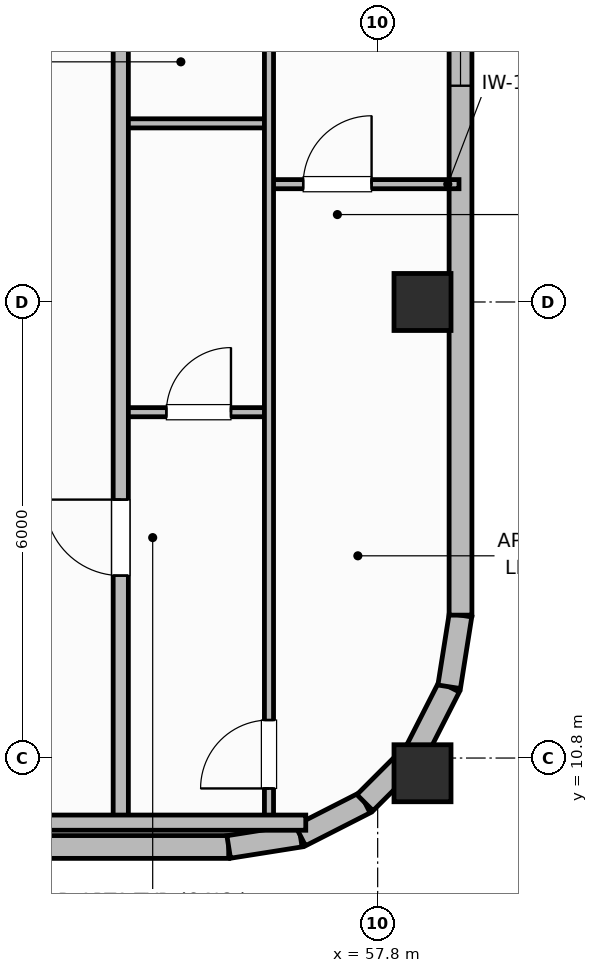
"""IFC4 building model, lengths in metres.
Left out: names, types, materials, properties, quantities, classifications, styles, units other than length and angle.
Written with IfcOpenShell. Run it as: python <this file> out.ifc"""

import sys

from ifc_helpers import new_model, si_unit, direction, frame, frame_2d, origin, origin_2d, place, context, subcontext, project, spatial, rectangle, extrude, element, fill, save


model = new_model("IFC4")
c1 = context("Model", 3, precision=1e-05, world=origin(), true_north=direction((0.0, 1.0)))
c2 = subcontext(c1, "Body", "Model", "MODEL_VIEW")
j1 = project(units=[si_unit("LENGTHUNIT", "METRE"), si_unit("PLANEANGLEUNIT", "RADIAN")], contexts=[c1])
p1 = place(None, origin())
s1 = spatial("IfcSite", under=j1, at=p1, CompositionType="ELEMENT")
p2 = place(p1, origin())
s2 = spatial("IfcBuilding", under=s1, at=p2, CompositionType="ELEMENT")
p3 = place(p2, frame((0.0, 0.0, 271.3)))
s3 = spatial("IfcBuildingStorey", under=s2, at=p3, CompositionType="ELEMENT", Elevation=271.3)
for number, where, z_axis, x_axis in (
    (1, (58.39, 10.6, 0.0), (0.0, 0.0, 1.0), (1.0, 0.0, 0.0)),
    (2, (58.39, 16.8, 0.0), (0.0, 0.0, 1.0), (1.0, 0.0, 0.0)),
):
    element("IfcColumn", number, at=place(p3, frame(where, z_axis=z_axis, x_axis=x_axis)), inside=s3, PredefinedType="COLUMN", context=c2, shape_type="SweptSolid", body=[
        extrude(rectangle(XDim=0.75, YDim=0.75, at=origin_2d()), origin(), (0.0, 0.0, 1.0), 3.7),
    ])
p4 = place(p3, frame((22.56, 9.63, 0.0), z_axis=(0.0, 0.0, 1.0), x_axis=(1.0, 0.0, 0.0)))
e3 = element("IfcWall", 3, at=p4, inside=s3, PredefinedType="SOLIDWALL", context=c2, shape_type="SweptSolid", body=[
    extrude(rectangle(XDim=33.28, YDim=0.3, at=frame_2d((16.64, 0.0))), origin(), (0.0, 0.0, 1.0), 2.73),
])
p5 = place(p4, frame((4.448, 0.0, 0.95)))
e4 = element("IfcOpeningElement", 4, at=p5, cuts=e3, PredefinedType="OPENING", context=c2, shape_type="SweptSolid", body=[
    extrude(rectangle(XDim=1.1, YDim=1.65, at=frame_2d((0.55, 0.825))), frame((0.0, 0.16, 0.0), z_axis=(0.0, -1.0, 0.0), x_axis=(1.0, 0.0, 0.0)), (0.0, 0.0, 1.0), 0.32),
])
p6 = place(p4, frame((6.762, 0.0, 0.95)))
e5 = element("IfcOpeningElement", 5, at=p6, cuts=e3, PredefinedType="OPENING", context=c2, shape_type="SweptSolid", body=[
    extrude(rectangle(XDim=1.1, YDim=1.65, at=frame_2d((0.55, 0.825))), frame((0.0, 0.16, 0.0), z_axis=(0.0, -1.0, 0.0), x_axis=(1.0, 0.0, 0.0)), (0.0, 0.0, 1.0), 0.32),
])
p7 = place(p4, frame((9.427, 0.0, 0.95)))
e6 = element("IfcOpeningElement", 6, at=p7, cuts=e3, PredefinedType="OPENING", context=c2, shape_type="SweptSolid", body=[
    extrude(rectangle(XDim=1.1, YDim=1.65, at=frame_2d((0.55, 0.825))), frame((0.0, 0.16, 0.0), z_axis=(0.0, -1.0, 0.0), x_axis=(1.0, 0.0, 0.0)), (0.0, 0.0, 1.0), 0.32),
])
p8 = place(p4, frame((14.758, 0.0, 0.95)))
e7 = element("IfcOpeningElement", 7, at=p8, cuts=e3, PredefinedType="OPENING", context=c2, shape_type="SweptSolid", body=[
    extrude(rectangle(XDim=1.1, YDim=1.65, at=frame_2d((0.55, 0.825))), frame((0.0, 0.16, 0.0), z_axis=(0.0, -1.0, 0.0), x_axis=(1.0, 0.0, 0.0)), (0.0, 0.0, 1.0), 0.32),
])
p9 = place(p4, frame((17.423, 0.0, 0.95)))
e8 = element("IfcOpeningElement", 8, at=p9, cuts=e3, PredefinedType="OPENING", context=c2, shape_type="SweptSolid", body=[
    extrude(rectangle(XDim=1.1, YDim=1.65, at=frame_2d((0.55, 0.825))), frame((0.0, 0.16, 0.0), z_axis=(0.0, -1.0, 0.0), x_axis=(1.0, 0.0, 0.0)), (0.0, 0.0, 1.0), 0.32),
])
p10 = place(p4, frame((22.752, 0.0, 0.95)))
e9 = element("IfcOpeningElement", 9, at=p10, cuts=e3, PredefinedType="OPENING", context=c2, shape_type="SweptSolid", body=[
    extrude(rectangle(XDim=1.1, YDim=1.65, at=frame_2d((0.55, 0.825))), frame((0.0, 0.16, 0.0), z_axis=(0.0, -1.0, 0.0), x_axis=(1.0, 0.0, 0.0)), (0.0, 0.0, 1.0), 0.32),
])
p11 = place(p4, frame((25.417, 0.0, 0.95)))
e10 = element("IfcOpeningElement", 10, at=p11, cuts=e3, PredefinedType="OPENING", context=c2, shape_type="SweptSolid", body=[
    extrude(rectangle(XDim=1.1, YDim=1.65, at=frame_2d((0.55, 0.825))), frame((0.0, 0.16, 0.0), z_axis=(0.0, -1.0, 0.0), x_axis=(1.0, 0.0, 0.0)), (0.0, 0.0, 1.0), 0.32),
])
p12 = place(p4, frame((27.732, 0.0, 0.95)))
e11 = element("IfcOpeningElement", 11, at=p12, cuts=e3, PredefinedType="OPENING", context=c2, shape_type="SweptSolid", body=[
    extrude(rectangle(XDim=1.1, YDim=1.65, at=frame_2d((0.55, 0.825))), frame((0.0, 0.16, 0.0), z_axis=(0.0, -1.0, 0.0), x_axis=(1.0, 0.0, 0.0)), (0.0, 0.0, 1.0), 0.32),
])
p13 = place(p3, frame((55.84, 9.63, 0.0), z_axis=(0.0, 0.0, 1.0), x_axis=(0.987663181641, 0.156593229835, 0.0)))
e12 = element("IfcWall", 12, at=p13, inside=s3, PredefinedType="SOLIDWALL", context=c2, shape_type="SweptSolid", body=[
    extrude(rectangle(XDim=0.954, YDim=0.3, at=frame_2d((0.477, 0.0))), origin(), (0.0, 0.0, 1.0), 2.73),
])
for number, where, z_axis, x_axis in (
    (13, (56.782, 9.779, 0.0), (0.0, 0.0, 1.0), (0.891, 0.454, 0.0)),
    (14, (57.633, 10.212, 0.0), (0.0, 0.0, 1.0), (0.707, 0.707, 0.0)),
    (15, (58.308, 10.887, 0.0), (0.0, 0.0, 1.0), (0.454, 0.891, 0.0)),
):
    element("IfcWall", number, at=place(p3, frame(where, z_axis=z_axis, x_axis=x_axis)), inside=s3, PredefinedType="SOLIDWALL", context=c2, shape_type="SweptSolid", body=[
        extrude(rectangle(XDim=0.954, YDim=0.3, at=frame_2d((0.477, 0.0))), origin(), (0.0, 0.0, 1.0), 2.73),
    ])
p14 = place(p3, frame((58.741, 11.738, 0.0), z_axis=(0.0, 0.0, 1.0), x_axis=(0.156343617883, 0.987702725088, 0.0)))
e16 = element("IfcWall", 16, at=p14, inside=s3, PredefinedType="SOLIDWALL", context=c2, shape_type="SweptSolid", body=[
    extrude(rectangle(XDim=0.954, YDim=0.3, at=frame_2d((0.477, 0.0))), origin(), (0.0, 0.0, 1.0), 2.73),
])
p15 = place(p3, frame((58.89, 12.68, 0.0), z_axis=(0.0, 0.0, 1.0), x_axis=(0.0, 1.0, 0.0)))
e17 = element("IfcWall", 17, at=p15, inside=s3, PredefinedType="SOLIDWALL", context=c2, shape_type="SweptSolid", body=[
    extrude(rectangle(XDim=11.12, YDim=0.3, at=frame_2d((5.56, 0.0))), origin(), (0.0, 0.0, 1.0), 2.73),
])
p16 = place(p15, frame((6.965, 0.0, 0.71)))
e18 = element("IfcOpeningElement", 18, at=p16, cuts=e17, PredefinedType="OPENING", context=c2, shape_type="SweptSolid", body=[
    extrude(rectangle(XDim=2.1, YDim=1.9, at=frame_2d((1.05, 0.95))), frame((0.0, 0.16, 0.0), z_axis=(0.0, -1.0, 0.0), x_axis=(1.0, 0.0, 0.0)), (0.0, 0.0, 1.0), 0.32),
])
p17 = place(p3, frame((54.42, 15.35, 0.0), z_axis=(0.0, 0.0, 1.0), x_axis=(1.0, 0.0, 0.0)))
e19 = element("IfcWall", 19, at=p17, inside=s3, PredefinedType="PARTITIONING", context=c2, shape_type="SweptSolid", body=[
    extrude(rectangle(XDim=1.95, YDim=0.12, at=frame_2d((0.975, 0.0))), origin(), (0.0, 0.0, 1.0), 2.56),
])
p18 = place(p17, frame((0.6, 0.0, 0.0)))
e20 = element("IfcOpeningElement", 20, at=p18, cuts=e19, PredefinedType="OPENING", context=c2, shape_type="SweptSolid", body=[
    extrude(rectangle(XDim=0.85, YDim=2.1, at=frame_2d((0.425, 1.05))), frame((0.0, 0.07, 0.0), z_axis=(0.0, -1.0, 0.0), x_axis=(1.0, 0.0, 0.0)), (0.0, 0.0, 1.0), 0.14),
])
p19 = place(p3, frame((54.42, 19.15, 0.0), z_axis=(0.0, 0.0, 1.0), x_axis=(1.0, 0.0, 0.0)))
e21 = element("IfcWall", 21, at=p19, inside=s3, PredefinedType="PARTITIONING", context=c2, shape_type="SweptSolid", body=[
    extrude(rectangle(XDim=1.95, YDim=0.12, at=frame_2d((0.975, 0.0))), origin(), (0.0, 0.0, 1.0), 2.56),
])
p20 = place(p3, frame((56.37, 18.35, 0.0), z_axis=(0.0, 0.0, 1.0), x_axis=(1.0, 0.0, 0.0)))
e22 = element("IfcWall", 22, at=p20, inside=s3, PredefinedType="PARTITIONING", context=c2, shape_type="SweptSolid", body=[
    extrude(rectangle(XDim=2.5, YDim=0.12, at=frame_2d((1.25, 0.0))), origin(), (0.0, 0.0, 1.0), 2.56),
])
p21 = place(p20, frame((0.45, 0.0, 0.0)))
e23 = element("IfcOpeningElement", 23, at=p21, cuts=e22, PredefinedType="OPENING", context=c2, shape_type="SweptSolid", body=[
    extrude(rectangle(XDim=0.9, YDim=2.1, at=frame_2d((0.45, 1.05))), frame((0.0, 0.07, 0.0), z_axis=(0.0, -1.0, 0.0), x_axis=(1.0, 0.0, 0.0)), (0.0, 0.0, 1.0), 0.14),
])
p22 = place(p3, frame((56.37, 9.99, 0.0), z_axis=(0.0, 0.0, 1.0), x_axis=(0.0, 1.0, 0.0)))
e24 = element("IfcWall", 24, at=p22, inside=s3, PredefinedType="PARTITIONING", context=c2, shape_type="SweptSolid", body=[
    extrude(rectangle(XDim=13.62, YDim=0.12, at=frame_2d((6.81, 0.0))), origin(), (0.0, 0.0, 1.0), 2.56),
])
p23 = place(p22, frame((0.41, 0.0, 0.0)))
e25 = element("IfcOpeningElement", 25, at=p23, cuts=e24, PredefinedType="OPENING", context=c2, shape_type="SweptSolid", body=[
    extrude(rectangle(XDim=0.9, YDim=2.1, at=frame_2d((0.45, 1.05))), frame((0.0, 0.07, 0.0), z_axis=(0.0, -1.0, 0.0), x_axis=(1.0, 0.0, 0.0)), (0.0, 0.0, 1.0), 0.14),
])
p24 = place(p22, frame((10.985, 0.0, 0.0)))
e26 = element("IfcOpeningElement", 26, at=p24, cuts=e24, PredefinedType="OPENING", context=c2, shape_type="SweptSolid", body=[
    extrude(rectangle(XDim=0.82, YDim=2.08, at=frame_2d((0.41, 1.04))), frame((0.0, 0.07, 0.0), z_axis=(0.0, -1.0, 0.0), x_axis=(1.0, 0.0, 0.0)), (0.0, 0.0, 1.0), 0.14),
])
p25 = place(p3, frame((54.42, 9.95, 0.0), z_axis=(0.0, 0.0, 1.0), x_axis=(0.0, 1.0, 0.0)))
e27 = element("IfcWall", 27, at=p25, inside=s3, PredefinedType="PARTITIONING", context=c2, shape_type="SweptSolid", body=[
    extrude(rectangle(XDim=36.5, YDim=0.2, at=frame_2d((18.25, 0.0))), origin(), (0.0, 0.0, 1.0), 2.56),
])
p26 = place(p25, frame((3.25, 0.0, 0.0)))
e28 = element("IfcOpeningElement", 28, at=p26, cuts=e27, PredefinedType="OPENING", context=c2, shape_type="SweptSolid", body=[
    extrude(rectangle(XDim=1.0, YDim=2.15, at=frame_2d((0.5, 1.075))), frame((0.0, 0.11, 0.0), z_axis=(0.0, -1.0, 0.0), x_axis=(1.0, 0.0, 0.0)), (0.0, 0.0, 1.0), 0.22),
])
p27 = place(p25, frame((14.25, 0.0, 0.0)))
e29 = element("IfcOpeningElement", 29, at=p27, cuts=e27, PredefinedType="OPENING", context=c2, shape_type="SweptSolid", body=[
    extrude(rectangle(XDim=1.0, YDim=2.15, at=frame_2d((0.5, 1.075))), frame((0.0, 0.11, 0.0), z_axis=(0.0, -1.0, 0.0), x_axis=(1.0, 0.0, 0.0)), (0.0, 0.0, 1.0), 0.22),
])
p28 = place(p3, frame((53.1, 9.95, 0.0), z_axis=(0.0, 0.0, 1.0), x_axis=(1.0, 0.0, 0.0)))
e30 = element("IfcWall", 30, at=p28, inside=s3, PredefinedType="PARTITIONING", context=c2, shape_type="SweptSolid", body=[
    extrude(rectangle(XDim=3.754, YDim=0.2, at=frame_2d((1.877, 0.0))), origin(), (0.0, 0.0, 1.0), 2.56),
])
p29 = place(p16, origin())
e31 = element("IfcWindow", 31, at=p29, inside=s3, PartitioningType="SINGLE_PANEL", PredefinedType="WINDOW", context=c2, shape_type="SweptSolid", body=[
    extrude(rectangle(XDim=2.1, YDim=1.9, at=frame_2d((1.05, 0.95))), frame((0.0, 0.03, 0.0), z_axis=(0.0, -1.0, 0.0), x_axis=(1.0, 0.0, 0.0)), (0.0, 0.0, 1.0), 0.06),
])
fill(e18, e31)
p30 = place(p18, origin())
e32 = element("IfcDoor", 32, at=p30, inside=s3, OperationType="SINGLE_SWING_RIGHT", PredefinedType="DOOR", context=c2, shape_type="SweptSolid", body=[
    extrude(rectangle(XDim=0.85, YDim=2.1, at=frame_2d((0.425, 1.05))), frame((0.0, 0.025, 0.0), z_axis=(0.0, -1.0, 0.0), x_axis=(1.0, 0.0, 0.0)), (0.0, 0.0, 1.0), 0.05),
])
fill(e20, e32)
p31 = place(p21, origin())
e33 = element("IfcDoor", 33, at=p31, inside=s3, OperationType="SINGLE_SWING_RIGHT", PredefinedType="DOOR", context=c2, shape_type="SweptSolid", body=[
    extrude(rectangle(XDim=0.9, YDim=2.1, at=frame_2d((0.45, 1.05))), frame((0.0, 0.025, 0.0), z_axis=(0.0, -1.0, 0.0), x_axis=(1.0, 0.0, 0.0)), (0.0, 0.0, 1.0), 0.05),
])
fill(e23, e33)
p32 = place(p23, origin())
e34 = element("IfcDoor", 34, at=p32, inside=s3, OperationType="SINGLE_SWING_LEFT", PredefinedType="DOOR", context=c2, shape_type="SweptSolid", body=[
    extrude(rectangle(XDim=0.9, YDim=2.1, at=frame_2d((0.45, 1.05))), frame((0.0, 0.025, 0.0), z_axis=(0.0, -1.0, 0.0), x_axis=(1.0, 0.0, 0.0)), (0.0, 0.0, 1.0), 0.05),
])
fill(e25, e34)
p33 = place(p26, origin())
e35 = element("IfcDoor", 35, at=p33, inside=s3, OperationType="SINGLE_SWING_RIGHT", PredefinedType="DOOR", context=c2, shape_type="SweptSolid", body=[
    extrude(rectangle(XDim=1.0, YDim=2.15, at=frame_2d((0.5, 1.075))), frame((0.0, 0.025, 0.0), z_axis=(0.0, -1.0, 0.0), x_axis=(1.0, 0.0, 0.0)), (0.0, 0.0, 1.0), 0.05),
])
fill(e28, e35)
save(model, sys.argv[1])
